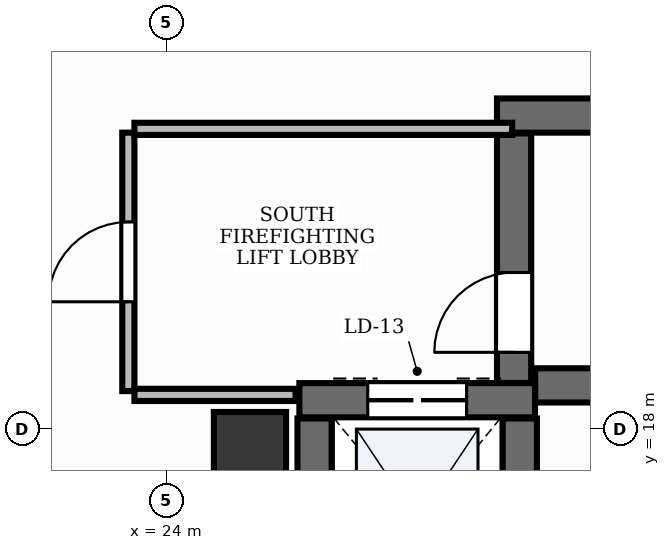
"""IFC4 building model, lengths in metres.
Left out: names, types, materials, properties, quantities, classifications, styles, units other than length and angle.
Written with IfcOpenShell. Run it as: python <this file> out.ifc"""

import sys

from ifc_helpers import new_model, si_unit, direction, frame, frame_2d, origin, origin_2d, place, context, subcontext, project, spatial, rectangle, extrude, element, fill, save


model = new_model("IFC4")
c1 = context("Model", 3, precision=1e-05, world=origin(), true_north=direction((0.0, 1.0)))
c2 = subcontext(c1, "Body", "Model", "MODEL_VIEW")
j1 = project(units=[si_unit("LENGTHUNIT", "METRE"), si_unit("PLANEANGLEUNIT", "RADIAN")], contexts=[c1])
p1 = place(None, origin())
s1 = spatial("IfcSite", under=j1, at=p1, CompositionType="ELEMENT")
p2 = place(p1, origin())
s2 = spatial("IfcBuilding", under=s1, at=p2, CompositionType="ELEMENT")
p3 = place(p2, frame((0.0, 0.0, 115.2)))
s3 = spatial("IfcBuildingStorey", under=s2, at=p3, CompositionType="ELEMENT", Elevation=115.2)
p4 = place(p3, frame((28.852, 18.575, 0.0), z_axis=(0.0, 0.0, 1.0), x_axis=(1.0, 0.0, 0.0)))
e1 = element("IfcWall", 1, at=p4, inside=s3, PredefinedType="SHEAR", context=c2, shape_type="SweptSolid", body=[
    extrude(rectangle(XDim=8.248, YDim=0.45, at=frame_2d((4.124, 0.0))), origin(), (0.0, 0.0, 1.0), 3.9),
])
p5 = place(p3, frame((28.35, 22.125, 0.0), z_axis=(0.0, 0.0, 1.0), x_axis=(1.0, 0.0, 0.0)))
e2 = element("IfcWall", 2, at=p5, inside=s3, PredefinedType="SHEAR", context=c2, shape_type="SweptSolid", body=[
    extrude(rectangle(XDim=8.75, YDim=0.45, at=frame_2d((4.375, 0.0))), origin(), (0.0, 0.0, 1.0), 3.9),
])
p6 = place(p3, frame((28.575, 18.607, 0.0), z_axis=(0.0, 0.0, 1.0), x_axis=(0.0, 1.0, 0.0)))
e3 = element("IfcWall", 3, at=p6, inside=s3, PredefinedType="SHEAR", context=c2, shape_type="SweptSolid", body=[
    extrude(rectangle(XDim=3.283, YDim=0.45, at=frame_2d((1.642, 0.0))), origin(), (0.0, 0.0, 1.0), 3.9),
])
p7 = place(p6, frame((0.403, 0.0, 0.0)))
e4 = element("IfcOpeningElement", 4, at=p7, cuts=e3, PredefinedType="OPENING", context=c2, shape_type="SweptSolid", body=[
    extrude(rectangle(XDim=1.05, YDim=2.15, at=frame_2d((0.525, 1.075))), frame((0.0, 0.24, 0.0), z_axis=(0.0, -1.0, 0.0), x_axis=(1.0, 0.0, 0.0)), (0.0, 0.0, 1.0), 0.48),
])
p8 = place(p3, frame((25.75, 18.38, 0.0), z_axis=(0.0, 0.0, 1.0), x_axis=(1.0, 0.0, 0.0)))
e5 = element("IfcWall", 5, at=p8, inside=s3, PredefinedType="SHEAR", context=c2, shape_type="SweptSolid", body=[
    extrude(rectangle(XDim=3.1, YDim=0.45, at=frame_2d((1.55, 0.0))), origin(), (0.0, 0.0, 1.0), 3.9),
])
p9 = place(p8, frame((0.9, 0.0, 0.0)))
e6 = element("IfcOpeningElement", 6, at=p9, cuts=e5, PredefinedType="OPENING", context=c2, shape_type="SweptSolid", body=[
    extrude(rectangle(XDim=1.3, YDim=2.2, at=frame_2d((0.65, 1.1))), frame((0.0, 0.24, 0.0), z_axis=(0.0, -1.0, 0.0), x_axis=(1.0, 0.0, 0.0)), (0.0, 0.0, 1.0), 0.48),
])
for number, where, z_axis, x_axis in (
    (7, (25.95, 15.44, 0.0), (0.0, 0.0, 1.0), (0.0, 1.0, 0.0)),
    (8, (28.65, 15.44, 0.0), (0.0, 0.0, 1.0), (0.0, 1.0, 0.0)),
):
    element("IfcWall", number, at=place(p3, frame(where, z_axis=z_axis, x_axis=x_axis)), inside=s3, PredefinedType="SHEAR", context=c2, shape_type="SweptSolid", body=[
        extrude(rectangle(XDim=2.7, YDim=0.45, at=frame_2d((1.35, 0.0))), origin(), (0.0, 0.0, 1.0), 3.9),
    ])
p10 = place(p3, frame((25.1, 17.75, -0.0), z_axis=(0.0, 0.0, 1.0), x_axis=(1.0, 0.0, 0.0)))
e9 = element("IfcColumn", 9, at=p10, inside=s3, PredefinedType="PILASTER", context=c2, shape_type="SweptSolid", body=[
    extrude(rectangle(XDim=0.95, YDim=0.95, at=origin_2d()), origin(), (0.0, 0.0, 1.0), 3.901),
])
p11 = place(p3, frame((23.5, 18.5, 0.0), z_axis=(0.0, 0.0, 1.0), x_axis=(0.0, 1.0, 0.0)))
e10 = element("IfcWall", 10, at=p11, inside=s3, PredefinedType="PARTITIONING", context=c2, shape_type="SweptSolid", body=[
    extrude(rectangle(XDim=3.4, YDim=0.16, at=frame_2d((1.7, 0.0))), origin(), (0.0, 0.0, 1.0), 2.91),
])
p12 = place(p11, frame((1.175, 0.0, 0.0)))
e11 = element("IfcOpeningElement", 11, at=p12, cuts=e10, PredefinedType="OPENING", context=c2, shape_type="SweptSolid", body=[
    extrude(rectangle(XDim=1.05, YDim=2.15, at=frame_2d((0.525, 1.075))), frame((0.0, 0.095, 0.0), z_axis=(0.0, -1.0, 0.0), x_axis=(1.0, 0.0, 0.0)), (0.0, 0.0, 1.0), 0.19),
])
p13 = place(p3, frame((23.58, 21.95, 0.0), z_axis=(0.0, 0.0, 1.0), x_axis=(1.0, 0.0, 0.0)))
e12 = element("IfcWall", 12, at=p13, inside=s3, PredefinedType="PARTITIONING", context=c2, shape_type="SweptSolid", body=[
    extrude(rectangle(XDim=4.97, YDim=0.16, at=frame_2d((2.485, 0.0))), origin(), (0.0, 0.0, 1.0), 2.91),
])
p14 = place(p3, frame((23.58, 18.45, 0.0), z_axis=(0.0, 0.0, 1.0), x_axis=(1.0, 0.0, 0.0)))
e13 = element("IfcWall", 13, at=p14, inside=s3, PredefinedType="PARTITIONING", context=c2, shape_type="SweptSolid", body=[
    extrude(rectangle(XDim=2.12, YDim=0.16, at=frame_2d((1.06, 0.0))), origin(), (0.0, 0.0, 1.0), 2.91),
])
p15 = place(p7, origin())
e14 = element("IfcDoor", 14, at=p15, inside=s3, OperationType="SINGLE_SWING_LEFT", PredefinedType="DOOR", context=c2, shape_type="SweptSolid", body=[
    extrude(rectangle(XDim=1.05, YDim=2.15, at=frame_2d((0.525, 1.075))), frame((0.0, 0.025, 0.0), z_axis=(0.0, -1.0, 0.0), x_axis=(1.0, 0.0, 0.0)), (0.0, 0.0, 1.0), 0.05),
])
fill(e4, e14)
p16 = place(p9, origin())
e15 = element("IfcDoor", 15, at=p16, inside=s3, OperationType="DOUBLE_DOOR_SLIDING", PredefinedType="DOOR", context=c2, shape_type="SweptSolid", body=[
    extrude(rectangle(XDim=1.3, YDim=2.2, at=frame_2d((0.65, 1.1))), frame((0.0, 0.025, 0.0), z_axis=(0.0, -1.0, 0.0), x_axis=(1.0, 0.0, 0.0)), (0.0, 0.0, 1.0), 0.05),
])
fill(e6, e15)
p17 = place(p12, origin())
e16 = element("IfcDoor", 16, at=p17, inside=s3, OperationType="SINGLE_SWING_LEFT", PredefinedType="DOOR", context=c2, shape_type="SweptSolid", body=[
    extrude(rectangle(XDim=1.05, YDim=2.15, at=frame_2d((0.525, 1.075))), frame((0.0, 0.025, 0.0), z_axis=(0.0, -1.0, 0.0), x_axis=(1.0, 0.0, 0.0)), (0.0, 0.0, 1.0), 0.05),
])
fill(e11, e16)
save(model, sys.argv[1])
